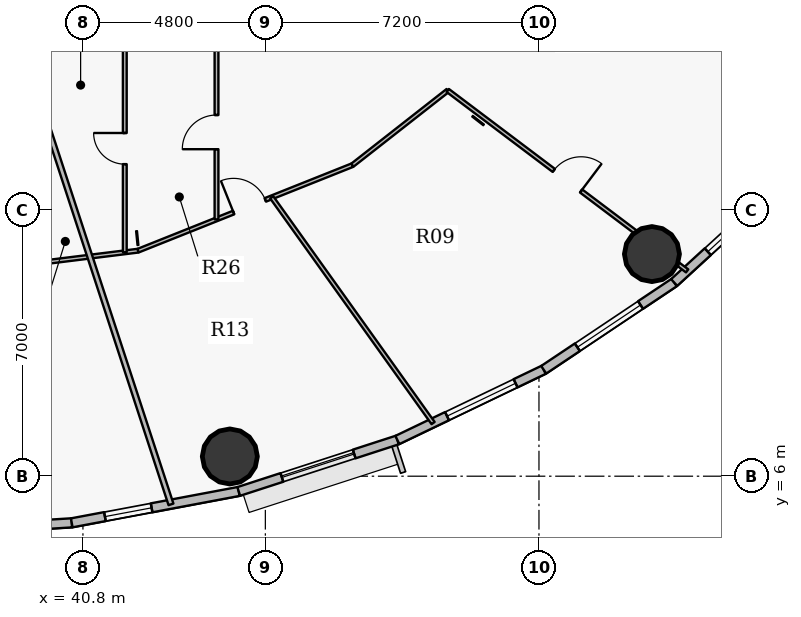
"""IFC4 building model, lengths in metres.
Left out: names, types, materials, properties, quantities, classifications, styles, units other than length and angle.
Written with IfcOpenShell. Run it as: python <this file> out.ifc"""

import sys

from ifc_helpers import new_model, si_unit, direction, frame, frame_2d, origin, origin_2d, place, context, subcontext, project, spatial, rectangle, hollow_circle, extrude, source, transform, mapped, element, fill, save


model = new_model("IFC4")
c1 = context("Model", 3, precision=1e-05, world=origin(), true_north=direction((0.0, 1.0)))
c2 = subcontext(c1, "Body", "Model", "MODEL_VIEW")
j1 = project(units=[si_unit("LENGTHUNIT", "METRE"), si_unit("PLANEANGLEUNIT", "RADIAN")], contexts=[c1])
p1 = place(None, origin())
s1 = spatial("IfcSite", under=j1, at=p1, CompositionType="ELEMENT")
p2 = place(p1, origin())
s2 = spatial("IfcBuilding", under=s1, at=p2, CompositionType="ELEMENT")
p3 = place(p2, frame((0.0, 0.0, 112.2)))
s3 = spatial("IfcBuildingStorey", under=s2, at=p3, CompositionType="ELEMENT", Elevation=112.2)
for number, where, z_axis, x_axis in (
    (1, (44.666, 6.519, 0.0), (0.0, 0.0, 1.0), (1.0, 0.0, 0.0)),
    (2, (55.773, 11.844, 0.0), (0.0, 0.0, 1.0), (1.0, 0.0, 0.0)),
):
    element("IfcColumn", number, at=place(p3, frame(where, z_axis=z_axis, x_axis=x_axis)), inside=s3, PredefinedType="COLUMN", context=c2, shape_type="SweptSolid", body=[
        extrude(hollow_circle(Radius=0.725, WallThickness=0.042, at=origin_2d()), origin(), (0.0, 0.0, 1.0), 3.75),
    ])
p4 = place(p3, frame((40.506, 4.773, 0.0), z_axis=(0.0, 0.0, 1.0), x_axis=(-0.998107531589, -0.061492726276, 0.0)))
e3 = element("IfcWall", 3, at=p4, inside=s3, PredefinedType="SOLIDWALL", context=c2, shape_type="SweptSolid", body=[
    extrude(rectangle(XDim=4.514, YDim=0.24, at=frame_2d((2.257, 0.0))), origin(), (0.0, 0.0, 1.0), 3.5),
])
p5 = place(p4, frame((1.257, 0.0, 0.9)))
e4 = element("IfcOpeningElement", 4, at=p5, cuts=e3, PredefinedType="OPENING", context=c2, shape_type="SweptSolid", body=[
    extrude(rectangle(XDim=2.0, YDim=1.75, at=origin_2d()), frame((1.0, 0.13, 0.875), z_axis=(0.0, -1.0, 0.0), x_axis=(1.0, 0.0, 0.0)), (0.0, 0.0, 1.0), 0.26),
])
p6 = place(p3, frame((44.9, 5.599, 0.0), z_axis=(0.0, 0.0, 1.0), x_axis=(-0.982789252177, -0.184730305596, 0.0)))
e5 = element("IfcWall", 5, at=p6, inside=s3, PredefinedType="SOLIDWALL", context=c2, shape_type="SweptSolid", body=[
    extrude(rectangle(XDim=4.471, YDim=0.24, at=frame_2d((2.235, 0.0))), origin(), (0.0, 0.0, 1.0), 3.5),
])
p7 = place(p6, frame((2.333, 0.0, 0.9)))
e6 = element("IfcOpeningElement", 6, at=p7, cuts=e5, PredefinedType="OPENING", context=c2, shape_type="SweptSolid", body=[
    extrude(rectangle(XDim=1.25, YDim=1.65, at=origin_2d()), frame((0.625, 0.13, 0.825), z_axis=(0.0, -1.0, 0.0), x_axis=(1.0, 0.0, 0.0)), (0.0, 0.0, 1.0), 0.26),
])
p8 = place(p3, frame((49.074, 6.953, 0.0), z_axis=(0.0, 0.0, 1.0), x_axis=(-0.951211346073, -0.308540070495, 0.0)))
e7 = element("IfcWall", 7, at=p8, inside=s3, PredefinedType="SOLIDWALL", context=c2, shape_type="SweptSolid", body=[
    extrude(rectangle(XDim=4.388, YDim=0.24, at=frame_2d((2.194, 0.0))), origin(), (0.0, 0.0, 1.0), 3.5),
])
p9 = place(p8, frame((1.194, 0.0, 0.9)))
e8 = element("IfcOpeningElement", 8, at=p9, cuts=e7, PredefinedType="OPENING", context=c2, shape_type="SweptSolid", body=[
    extrude(rectangle(XDim=2.0, YDim=1.75, at=origin_2d()), frame((1.0, 0.13, 0.875), z_axis=(0.0, -1.0, 0.0), x_axis=(1.0, 0.0, 0.0)), (0.0, 0.0, 1.0), 0.26),
])
p10 = place(p3, frame((52.925, 8.801, 0.0), z_axis=(0.0, 0.0, 1.0), x_axis=(-0.901589935876, -0.432591709962, 0.0)))
e9 = element("IfcWall", 9, at=p10, inside=s3, PredefinedType="SOLIDWALL", context=c2, shape_type="SweptSolid", body=[
    extrude(rectangle(XDim=4.272, YDim=0.24, at=frame_2d((2.136, 0.0))), origin(), (0.0, 0.0, 1.0), 3.5),
])
p11 = place(p10, frame((0.821, 0.0, 0.9)))
e10 = element("IfcOpeningElement", 10, at=p11, cuts=e9, PredefinedType="OPENING", context=c2, shape_type="SweptSolid", body=[
    extrude(rectangle(XDim=2.0, YDim=1.75, at=origin_2d()), frame((1.0, 0.13, 0.875), z_axis=(0.0, -1.0, 0.0), x_axis=(1.0, 0.0, 0.0)), (0.0, 0.0, 1.0), 0.26),
])
p12 = place(p3, frame((56.358, 11.097, 0.0), z_axis=(0.0, 0.0, 1.0), x_axis=(-0.831221811447, -0.555940914284, 0.0)))
e11 = element("IfcWall", 11, at=p12, inside=s3, PredefinedType="SOLIDWALL", context=c2, shape_type="SweptSolid", body=[
    extrude(rectangle(XDim=4.13, YDim=0.24, at=frame_2d((2.065, 0.0))), origin(), (0.0, 0.0, 1.0), 3.5),
])
p13 = place(p12, frame((1.065, 0.0, 0.9)))
e12 = element("IfcOpeningElement", 12, at=p13, cuts=e11, PredefinedType="OPENING", context=c2, shape_type="SweptSolid", body=[
    extrude(rectangle(XDim=2.0, YDim=1.75, at=origin_2d()), frame((1.0, 0.13, 0.875), z_axis=(0.0, -1.0, 0.0), x_axis=(1.0, 0.0, 0.0)), (0.0, 0.0, 1.0), 0.26),
])
p14 = place(p3, frame((59.289, 13.783, 0.0), z_axis=(0.0, 0.0, 1.0), x_axis=(-0.737113356241, -0.675769117414, 0.0)))
e13 = element("IfcWall", 13, at=p14, inside=s3, PredefinedType="SOLIDWALL", context=c2, shape_type="SweptSolid", body=[
    extrude(rectangle(XDim=3.976, YDim=0.24, at=frame_2d((1.988, 0.0))), origin(), (0.0, 0.0, 1.0), 3.5),
])
p15 = place(p14, frame((0.776, 0.0, 0.9)))
e14 = element("IfcOpeningElement", 14, at=p15, cuts=e13, PredefinedType="OPENING", context=c2, shape_type="SweptSolid", body=[
    extrude(rectangle(XDim=2.0, YDim=1.75, at=origin_2d()), frame((1.0, 0.13, 0.875), z_axis=(0.0, -1.0, 0.0), x_axis=(1.0, 0.0, 0.0)), (0.0, 0.0, 1.0), 0.26),
])
p16 = place(p3, frame((36.0, 11.159, 0.0), z_axis=(0.0, 0.0, 1.0), x_axis=(0.992395485088, 0.123090215599, 0.0)))
e15 = element("IfcWall", 15, at=p16, inside=s3, PredefinedType="PARTITIONING", context=c2, shape_type="SweptSolid", body=[
    extrude(rectangle(XDim=6.299, YDim=0.1, at=frame_2d((3.15, 0.0))), origin(), (0.0, 0.0, 1.0), 2.935),
])
p17 = place(p3, frame((39.175, 17.301, 0.0), z_axis=(0.0, 0.0, 1.0), x_axis=(0.311090320612, -0.95038035145, 0.0)))
e16 = element("IfcWall", 16, at=p17, inside=s3, PredefinedType="PARTITIONING", context=c2, shape_type="SweptSolid", body=[
    extrude(rectangle(XDim=12.671, YDim=0.135, at=frame_2d((6.335, 0.0))), origin(), (0.0, 0.0, 1.0), 2.935),
])
p18 = place(p3, frame((41.901, 11.891, 0.0), z_axis=(0.0, 0.0, 1.0), x_axis=(0.0, 1.0, 0.0)))
e17 = element("IfcWall", 17, at=p18, inside=s3, PredefinedType="PARTITIONING", context=c2, shape_type="SweptSolid", body=[
    extrude(rectangle(XDim=5.459, YDim=0.1, at=frame_2d((2.729, 0.0))), origin(), (0.0, 0.0, 1.0), 2.935),
])
p19 = place(p18, frame((2.32, 0.0, 0.0)))
e18 = element("IfcOpeningElement", 18, at=p19, cuts=e17, PredefinedType="OPENING", context=c2, shape_type="SweptSolid", body=[
    extrude(rectangle(XDim=0.82, YDim=2.1, at=origin_2d()), frame((0.41, 0.06, 1.05), z_axis=(0.0, -1.0, 0.0), x_axis=(1.0, 0.0, 0.0)), (0.0, 0.0, 1.0), 0.12),
])
p20 = place(p3, frame((42.251, 11.934, 0.0), z_axis=(0.0, 0.0, 1.0), x_axis=(0.928803554156, 0.370572473055, 0.0)))
e19 = element("IfcWall", 19, at=p20, inside=s3, PredefinedType="PARTITIONING", context=c2, shape_type="SweptSolid", body=[
    extrude(rectangle(XDim=6.072, YDim=0.1, at=frame_2d((3.036, 0.0))), origin(), (0.0, 0.0, 1.0), 2.935),
])
p21 = place(p20, frame((2.705, 0.0, 0.0)))
e20 = element("IfcOpeningElement", 20, at=p21, cuts=e19, PredefinedType="OPENING", context=c2, shape_type="SweptSolid", body=[
    extrude(rectangle(XDim=0.9, YDim=2.1, at=origin_2d()), frame((0.45, 0.06, 1.05), z_axis=(0.0, -1.0, 0.0), x_axis=(1.0, 0.0, 0.0)), (0.0, 0.0, 1.0), 0.12),
])
p22 = place(p3, frame((44.315, 12.758, 0.0), z_axis=(0.0, 0.0, 1.0), x_axis=(0.0, 1.0, 0.0)))
e21 = element("IfcWall", 21, at=p22, inside=s3, PredefinedType="PARTITIONING", context=c2, shape_type="SweptSolid", body=[
    extrude(rectangle(XDim=4.593, YDim=0.1, at=frame_2d((2.296, 0.0))), origin(), (0.0, 0.0, 1.0), 3.5),
])
p23 = place(p22, frame((1.846, 0.0, 0.0)))
e22 = element("IfcOpeningElement", 22, at=p23, cuts=e21, PredefinedType="OPENING", context=c2, shape_type="SweptSolid", body=[
    extrude(rectangle(XDim=0.9, YDim=2.1, at=origin_2d()), frame((0.45, 0.06, 1.05), z_axis=(0.0, -1.0, 0.0), x_axis=(1.0, 0.0, 0.0)), (0.0, 0.0, 1.0), 0.12),
])
p24 = place(p3, frame((45.768, 13.337, 0.0), z_axis=(0.0, 0.0, 1.0), x_axis=(0.581582931767, -0.813487119429, 0.0)))
e23 = element("IfcWall", 23, at=p24, inside=s3, PredefinedType="PARTITIONING", context=c2, shape_type="SweptSolid", body=[
    extrude(rectangle(XDim=7.301, YDim=0.1, at=frame_2d((3.65, 0.0))), origin(), (0.0, 0.0, 1.0), 2.935),
])
p25 = place(p3, frame((47.891, 14.184, 0.0), z_axis=(0.0, 0.0, 1.0), x_axis=(0.787351391371, 0.616504490256, 0.0)))
e24 = element("IfcWall", 24, at=p25, inside=s3, PredefinedType="PARTITIONING", context=c2, shape_type="SweptSolid", body=[
    extrude(rectangle(XDim=3.187, YDim=0.1, at=frame_2d((1.593, 0.0))), origin(), (0.0, 0.0, 1.0), 2.935),
])
p26 = place(p3, frame((50.4, 16.149, 0.0), z_axis=(0.0, 0.0, 1.0), x_axis=(0.79862729849, -0.601825920102, 0.0)))
e25 = element("IfcWall", 25, at=p26, inside=s3, PredefinedType="PARTITIONING", context=c2, shape_type="SweptSolid", body=[
    extrude(rectangle(XDim=7.887, YDim=0.1, at=frame_2d((3.944, 0.0))), origin(), (0.0, 0.0, 1.0), 2.935),
])
p27 = place(p26, frame((3.494, 0.0, 0.0)))
e26 = element("IfcOpeningElement", 26, at=p27, cuts=e25, PredefinedType="OPENING", context=c2, shape_type="SweptSolid", body=[
    extrude(rectangle(XDim=0.9, YDim=2.1, at=origin_2d()), frame((0.45, 0.06, 1.05), z_axis=(0.0, -1.0, 0.0), x_axis=(1.0, 0.0, 0.0)), (0.0, 0.0, 1.0), 0.12),
])
m1 = source(origin(), c2, "Body", "SweptSolid", [
    extrude(rectangle(XDim=1.25, YDim=1.65, at=origin_2d()), frame((0.625, 0.03, 0.825), z_axis=(0.0, -1.0, 0.0), x_axis=(1.0, 0.0, 0.0)), (0.0, 0.0, 1.0), 0.06),
])
p28 = place(p7, origin())
e27 = element("IfcWindow", 27, at=p28, inside=s3, PartitioningType="SINGLE_PANEL", PredefinedType="WINDOW", context=c2, shape_type="MappedRepresentation", body=[
    mapped(m1, transform((0.0, 0.0, 0.0), x_axis=(1.0, 0.0, 0.0), y_axis=(0.0, 1.0, 0.0), z_axis=(0.0, 0.0, 1.0), scale=1.0)),
])
fill(e6, e27)
m2 = source(origin(), c2, "Body", "SweptSolid", [
    extrude(rectangle(XDim=2.0, YDim=1.75, at=origin_2d()), frame((1.0, 0.03, 0.875), z_axis=(0.0, -1.0, 0.0), x_axis=(1.0, 0.0, 0.0)), (0.0, 0.0, 1.0), 0.06),
])
p29 = place(p9, origin())
e28 = element("IfcWindow", 28, at=p29, inside=s3, PartitioningType="DOUBLE_PANEL_VERTICAL", PredefinedType="WINDOW", context=c2, shape_type="MappedRepresentation", body=[
    mapped(m2, transform((0.0, 0.0, 0.0), x_axis=(1.0, 0.0, 0.0), y_axis=(0.0, 1.0, 0.0), z_axis=(0.0, 0.0, 1.0), scale=1.0)),
])
fill(e8, e28)
p30 = place(p11, origin())
e29 = element("IfcWindow", 29, at=p30, inside=s3, PartitioningType="DOUBLE_PANEL_VERTICAL", PredefinedType="WINDOW", context=c2, shape_type="MappedRepresentation", body=[
    mapped(m2, transform((0.0, 0.0, 0.0), x_axis=(1.0, 0.0, 0.0), y_axis=(0.0, 1.0, 0.0), z_axis=(0.0, 0.0, 1.0), scale=1.0)),
])
fill(e10, e29)
p31 = place(p13, origin())
e30 = element("IfcWindow", 30, at=p31, inside=s3, PartitioningType="DOUBLE_PANEL_VERTICAL", PredefinedType="WINDOW", context=c2, shape_type="MappedRepresentation", body=[
    mapped(m2, transform((0.0, 0.0, 0.0), x_axis=(1.0, 0.0, 0.0), y_axis=(0.0, 1.0, 0.0), z_axis=(0.0, 0.0, 1.0), scale=1.0)),
])
fill(e12, e30)
p32 = place(p15, origin())
e31 = element("IfcWindow", 31, at=p32, inside=s3, PartitioningType="DOUBLE_PANEL_VERTICAL", PredefinedType="WINDOW", context=c2, shape_type="MappedRepresentation", body=[
    mapped(m2, transform((0.0, 0.0, 0.0), x_axis=(1.0, 0.0, 0.0), y_axis=(0.0, 1.0, 0.0), z_axis=(0.0, 0.0, 1.0), scale=1.0)),
])
fill(e14, e31)
m3 = source(origin(), c2, "Body", "SweptSolid", [
    extrude(rectangle(XDim=0.9, YDim=2.1, at=origin_2d()), frame((0.45, 0.025, 1.05), z_axis=(0.0, -1.0, 0.0), x_axis=(1.0, 0.0, 0.0)), (0.0, 0.0, 1.0), 0.05),
])
p33 = place(p21, origin())
e32 = element("IfcDoor", 32, at=p33, inside=s3, OperationType="SINGLE_SWING_LEFT", PredefinedType="DOOR", context=c2, shape_type="MappedRepresentation", body=[
    mapped(m3, transform((0.0, 0.0, 0.0), x_axis=(1.0, 0.0, 0.0), y_axis=(0.0, 1.0, 0.0), z_axis=(0.0, 0.0, 1.0), scale=1.0)),
])
fill(e20, e32)
p34 = place(p27, origin())
e33 = element("IfcDoor", 33, at=p34, inside=s3, OperationType="SINGLE_SWING_RIGHT", PredefinedType="DOOR", context=c2, shape_type="MappedRepresentation", body=[
    mapped(m3, transform((0.0, 0.0, 0.0), x_axis=(1.0, 0.0, 0.0), y_axis=(0.0, 1.0, 0.0), z_axis=(0.0, 0.0, 1.0), scale=1.0)),
])
fill(e26, e33)
p35 = place(p23, origin())
e34 = element("IfcDoor", 34, at=p35, inside=s3, OperationType="SINGLE_SWING_LEFT", PredefinedType="DOOR", context=c2, shape_type="MappedRepresentation", body=[
    mapped(m3, transform((0.0, 0.0, 0.0), x_axis=(1.0, 0.0, 0.0), y_axis=(0.0, 1.0, 0.0), z_axis=(0.0, 0.0, 1.0), scale=1.0)),
])
fill(e22, e34)
m4 = source(origin(), c2, "Body", "SweptSolid", [
    extrude(rectangle(XDim=0.82, YDim=2.1, at=origin_2d()), frame((0.41, 0.025, 1.05), z_axis=(0.0, -1.0, 0.0), x_axis=(1.0, 0.0, 0.0)), (0.0, 0.0, 1.0), 0.05),
])
p36 = place(p19, origin())
e35 = element("IfcDoor", 35, at=p36, inside=s3, OperationType="SINGLE_SWING_RIGHT", PredefinedType="DOOR", context=c2, shape_type="MappedRepresentation", body=[
    mapped(m4, transform((0.0, 0.0, 0.0), x_axis=(1.0, 0.0, 0.0), y_axis=(0.0, 1.0, 0.0), z_axis=(0.0, 0.0, 1.0), scale=1.0)),
])
fill(e18, e35)
save(model, sys.argv[1])
